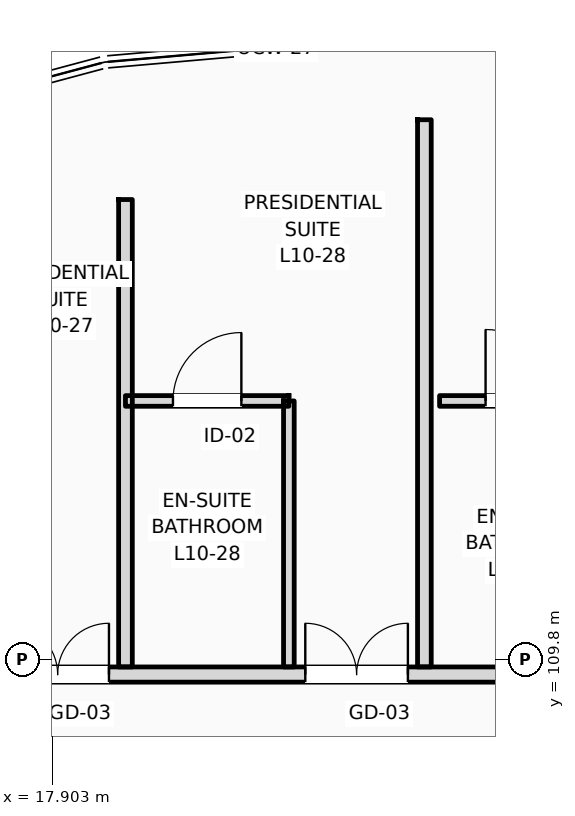
"""IFC4 building model, lengths in metres.
Left out: names, types, materials, properties, quantities, classifications, styles, units other than length and angle.
Written with IfcOpenShell. Run it as: python <this file> out.ifc"""

import sys

from ifc_helpers import new_model, si_unit, direction, frame, frame_2d, origin, place, context, subcontext, project, spatial, rectangle, extrude, element, fill, save


model = new_model("IFC4")
c1 = context("Model", 3, precision=1e-05, world=origin(), true_north=direction((0.0, 1.0)))
c2 = subcontext(c1, "Body", "Model", "MODEL_VIEW")
j1 = project(units=[si_unit("LENGTHUNIT", "METRE"), si_unit("PLANEANGLEUNIT", "RADIAN")], contexts=[c1])
p1 = place(None, origin())
s1 = spatial("IfcSite", under=j1, at=p1, CompositionType="ELEMENT")
p2 = place(p1, origin())
s2 = spatial("IfcBuilding", under=s1, at=p2, CompositionType="ELEMENT")
p3 = place(p2, frame((0.0, 0.0, 42.6)))
s3 = spatial("IfcBuildingStorey", under=s2, at=p3, CompositionType="ELEMENT", Elevation=42.6)
p4 = place(p3, frame((10.65, 109.6, 0.0), z_axis=(0.0, 0.0, 1.0), x_axis=(1.0, 0.0, 0.0)))
e1 = element("IfcWall", 1, at=p4, inside=s3, PredefinedType="PARTITIONING", context=c2, shape_type="SweptSolid", body=[
    extrude(rectangle(XDim=84.61, YDim=0.2, at=frame_2d((42.305, 0.0))), origin(), (0.0, 0.0, 1.0), 3.38),
])
p5 = place(p4, frame((15.926, 0.0, 0.0)))
e2 = element("IfcOpeningElement", 2, at=p5, cuts=e1, PredefinedType="OPENING", context=c2, shape_type="SweptSolid", body=[
    extrude(rectangle(XDim=1.02, YDim=2.2, at=frame_2d((0.51, 1.1))), frame((0.0, 0.11, 0.0), z_axis=(0.0, -1.0, 0.0), x_axis=(1.0, 0.0, 0.0)), (0.0, 0.0, 1.0), 0.22),
])
p6 = place(p4, frame((18.45, 0.0, 0.0)))
e3 = element("IfcOpeningElement", 3, at=p6, cuts=e1, PredefinedType="OPENING", context=c2, shape_type="SweptSolid", body=[
    extrude(rectangle(XDim=1.02, YDim=2.2, at=frame_2d((0.51, 1.1))), frame((0.0, 0.11, 0.0), z_axis=(0.0, -1.0, 0.0), x_axis=(1.0, 0.0, 0.0)), (0.0, 0.0, 1.0), 0.22),
])
p7 = place(p4, frame((25.742, 0.0, 0.0)))
e4 = element("IfcOpeningElement", 4, at=p7, cuts=e1, PredefinedType="OPENING", context=c2, shape_type="SweptSolid", body=[
    extrude(rectangle(XDim=1.02, YDim=2.2, at=frame_2d((0.51, 1.1))), frame((0.0, 0.11, 0.0), z_axis=(0.0, -1.0, 0.0), x_axis=(1.0, 0.0, 0.0)), (0.0, 0.0, 1.0), 0.22),
])
p8 = place(p4, frame((31.385, 0.0, 0.0)))
e5 = element("IfcOpeningElement", 5, at=p8, cuts=e1, PredefinedType="OPENING", context=c2, shape_type="SweptSolid", body=[
    extrude(rectangle(XDim=1.02, YDim=2.2, at=frame_2d((0.51, 1.1))), frame((0.0, 0.11, 0.0), z_axis=(0.0, -1.0, 0.0), x_axis=(1.0, 0.0, 0.0)), (0.0, 0.0, 1.0), 0.22),
])
p9 = place(p4, frame((33.908, 0.0, 0.0)))
e6 = element("IfcOpeningElement", 6, at=p9, cuts=e1, PredefinedType="OPENING", context=c2, shape_type="SweptSolid", body=[
    extrude(rectangle(XDim=0.96, YDim=2.2, at=frame_2d((0.48, 1.1))), frame((0.0, 0.11, 0.0), z_axis=(0.0, -1.0, 0.0), x_axis=(1.0, 0.0, 0.0)), (0.0, 0.0, 1.0), 0.22),
])
p10 = place(p4, frame((41.201, 0.0, 0.0)))
e7 = element("IfcOpeningElement", 7, at=p10, cuts=e1, PredefinedType="OPENING", context=c2, shape_type="SweptSolid", body=[
    extrude(rectangle(XDim=0.96, YDim=2.2, at=frame_2d((0.48, 1.1))), frame((0.0, 0.11, 0.0), z_axis=(0.0, -1.0, 0.0), x_axis=(1.0, 0.0, 0.0)), (0.0, 0.0, 1.0), 0.22),
])
p11 = place(p4, frame((46.844, 0.0, 0.0)))
e8 = element("IfcOpeningElement", 8, at=p11, cuts=e1, PredefinedType="OPENING", context=c2, shape_type="SweptSolid", body=[
    extrude(rectangle(XDim=0.96, YDim=2.2, at=frame_2d((0.48, 1.1))), frame((0.0, 0.11, 0.0), z_axis=(0.0, -1.0, 0.0), x_axis=(1.0, 0.0, 0.0)), (0.0, 0.0, 1.0), 0.22),
])
p12 = place(p4, frame((49.337, 0.0, 0.0)))
e9 = element("IfcOpeningElement", 9, at=p12, cuts=e1, PredefinedType="OPENING", context=c2, shape_type="SweptSolid", body=[
    extrude(rectangle(XDim=0.96, YDim=2.2, at=frame_2d((0.48, 1.1))), frame((0.0, 0.11, 0.0), z_axis=(0.0, -1.0, 0.0), x_axis=(1.0, 0.0, 0.0)), (0.0, 0.0, 1.0), 0.22),
])
p13 = place(p4, frame((56.63, 0.0, 0.0)))
e10 = element("IfcOpeningElement", 10, at=p13, cuts=e1, PredefinedType="OPENING", context=c2, shape_type="SweptSolid", body=[
    extrude(rectangle(XDim=0.96, YDim=2.2, at=frame_2d((0.48, 1.1))), frame((0.0, 0.11, 0.0), z_axis=(0.0, -1.0, 0.0), x_axis=(1.0, 0.0, 0.0)), (0.0, 0.0, 1.0), 0.22),
])
p14 = place(p4, frame((62.523, 0.0, 0.0)))
e11 = element("IfcOpeningElement", 11, at=p14, cuts=e1, PredefinedType="OPENING", context=c2, shape_type="SweptSolid", body=[
    extrude(rectangle(XDim=0.96, YDim=2.2, at=frame_2d((0.48, 1.1))), frame((0.0, 0.11, 0.0), z_axis=(0.0, -1.0, 0.0), x_axis=(1.0, 0.0, 0.0)), (0.0, 0.0, 1.0), 0.22),
])
p15 = place(p4, frame((64.765, 0.0, 0.0)))
e12 = element("IfcOpeningElement", 12, at=p15, cuts=e1, PredefinedType="OPENING", context=c2, shape_type="SweptSolid", body=[
    extrude(rectangle(XDim=0.96, YDim=2.2, at=frame_2d((0.48, 1.1))), frame((0.0, 0.11, 0.0), z_axis=(0.0, -1.0, 0.0), x_axis=(1.0, 0.0, 0.0)), (0.0, 0.0, 1.0), 0.22),
])
p16 = place(p4, frame((72.057, 0.0, 0.0)))
e13 = element("IfcOpeningElement", 13, at=p16, cuts=e1, PredefinedType="OPENING", context=c2, shape_type="SweptSolid", body=[
    extrude(rectangle(XDim=0.96, YDim=2.2, at=frame_2d((0.48, 1.1))), frame((0.0, 0.11, 0.0), z_axis=(0.0, -1.0, 0.0), x_axis=(1.0, 0.0, 0.0)), (0.0, 0.0, 1.0), 0.22),
])
p17 = place(p4, frame((74.55, 0.0, 0.0)))
e14 = element("IfcOpeningElement", 14, at=p17, cuts=e1, PredefinedType="OPENING", context=c2, shape_type="SweptSolid", body=[
    extrude(rectangle(XDim=0.96, YDim=2.2, at=frame_2d((0.48, 1.1))), frame((0.0, 0.11, 0.0), z_axis=(0.0, -1.0, 0.0), x_axis=(1.0, 0.0, 0.0)), (0.0, 0.0, 1.0), 0.22),
])
p18 = place(p4, frame((80.163, 0.0, 0.0)))
e15 = element("IfcOpeningElement", 15, at=p18, cuts=e1, PredefinedType="OPENING", context=c2, shape_type="SweptSolid", body=[
    extrude(rectangle(XDim=0.96, YDim=2.2, at=frame_2d((0.48, 1.1))), frame((0.0, 0.11, 0.0), z_axis=(0.0, -1.0, 0.0), x_axis=(1.0, 0.0, 0.0)), (0.0, 0.0, 1.0), 0.22),
])
p19 = place(p4, frame((2.716, 0.0, 0.0)))
e16 = element("IfcOpeningElement", 16, at=p19, cuts=e1, PredefinedType="OPENING", context=c2, shape_type="SweptSolid", body=[
    extrude(rectangle(XDim=1.35, YDim=2.25, at=frame_2d((0.675, 1.125))), frame((0.0, 0.11, 0.0), z_axis=(0.0, -1.0, 0.0), x_axis=(1.0, 0.0, 0.0)), (0.0, 0.0, 1.0), 0.22),
])
p20 = place(p4, frame((6.65, 0.0, 0.0)))
e17 = element("IfcOpeningElement", 17, at=p20, cuts=e1, PredefinedType="OPENING", context=c2, shape_type="SweptSolid", body=[
    extrude(rectangle(XDim=1.35, YDim=2.25, at=frame_2d((0.675, 1.125))), frame((0.0, 0.11, 0.0), z_axis=(0.0, -1.0, 0.0), x_axis=(1.0, 0.0, 0.0)), (0.0, 0.0, 1.0), 0.22),
])
p21 = place(p4, frame((10.583, 0.0, 0.0)))
e18 = element("IfcOpeningElement", 18, at=p21, cuts=e1, PredefinedType="OPENING", context=c2, shape_type="SweptSolid", body=[
    extrude(rectangle(XDim=1.35, YDim=2.25, at=frame_2d((0.675, 1.125))), frame((0.0, 0.11, 0.0), z_axis=(0.0, -1.0, 0.0), x_axis=(1.0, 0.0, 0.0)), (0.0, 0.0, 1.0), 0.22),
])
p22 = place(p3, frame((23.0, 113.2, 0.0), z_axis=(0.0, 0.0, 1.0), x_axis=(1.0, 0.0, 0.0)))
e19 = element("IfcWall", 19, at=p22, inside=s3, PredefinedType="PARTITIONING", context=c2, shape_type="SweptSolid", body=[
    extrude(rectangle(XDim=2.15, YDim=0.14, at=frame_2d((1.075, 0.0))), origin(), (0.0, 0.0, 1.0), 3.94),
])
p23 = place(p22, frame((0.605, 0.0, 0.0)))
e20 = element("IfcOpeningElement", 20, at=p23, cuts=e19, PredefinedType="OPENING", context=c2, shape_type="SweptSolid", body=[
    extrude(rectangle(XDim=0.94, YDim=2.15, at=frame_2d((0.47, 1.075))), frame((0.0, 0.08, 0.0), z_axis=(0.0, -1.0, 0.0), x_axis=(1.0, 0.0, 0.0)), (0.0, 0.0, 1.0), 0.16),
])
p24 = place(p3, frame((18.867, 109.7, 0.0), z_axis=(0.0, 0.0, 1.0), x_axis=(0.0, 1.0, 0.0)))
e21 = element("IfcWall", 21, at=p24, inside=s3, PredefinedType="PARTITIONING", context=c2, shape_type="SweptSolid", body=[
    extrude(rectangle(XDim=6.15, YDim=0.18, at=frame_2d((3.075, 0.0))), origin(), (0.0, 0.0, 1.0), 3.94),
])
p25 = place(p3, frame((22.8, 109.7, 0.0), z_axis=(0.0, 0.0, 1.0), x_axis=(0.0, 1.0, 0.0)))
e22 = element("IfcWall", 22, at=p25, inside=s3, PredefinedType="PARTITIONING", context=c2, shape_type="SweptSolid", body=[
    extrude(rectangle(XDim=7.2, YDim=0.18, at=frame_2d((3.6, 0.0))), origin(), (0.0, 0.0, 1.0), 3.94),
])
p26 = place(p3, frame((21.017, 109.7, 0.0), z_axis=(0.0, 0.0, 1.0), x_axis=(0.0, 1.0, 0.0)))
e23 = element("IfcWall", 23, at=p26, inside=s3, PredefinedType="PARTITIONING", context=c2, shape_type="SweptSolid", body=[
    extrude(rectangle(XDim=3.5, YDim=0.14, at=frame_2d((1.75, 0.0))), origin(), (0.0, 0.0, 1.0), 3.94),
])
p27 = place(p3, frame((18.867, 113.2, 0.0), z_axis=(0.0, 0.0, 1.0), x_axis=(1.0, 0.0, 0.0)))
e24 = element("IfcWall", 24, at=p27, inside=s3, PredefinedType="PARTITIONING", context=c2, shape_type="SweptSolid", body=[
    extrude(rectangle(XDim=2.15, YDim=0.14, at=frame_2d((1.075, 0.0))), origin(), (0.0, 0.0, 1.0), 3.94),
])
p28 = place(p27, frame((0.625, 0.0, 0.0)))
e25 = element("IfcOpeningElement", 25, at=p28, cuts=e24, PredefinedType="OPENING", context=c2, shape_type="SweptSolid", body=[
    extrude(rectangle(XDim=0.9, YDim=2.1, at=frame_2d((0.45, 1.05))), frame((0.0, 0.08, 0.0), z_axis=(0.0, -1.0, 0.0), x_axis=(1.0, 0.0, 0.0)), (0.0, 0.0, 1.0), 0.16),
])
p29 = place(p23, origin())
e26 = element("IfcDoor", 26, at=p29, inside=s3, OperationType="SINGLE_SWING_LEFT", PredefinedType="DOOR", context=c2, shape_type="SweptSolid", body=[
    extrude(rectangle(XDim=0.94, YDim=2.15, at=frame_2d((0.47, 1.075))), frame((0.0, 0.025, 0.0), z_axis=(0.0, -1.0, 0.0), x_axis=(1.0, 0.0, 0.0)), (0.0, 0.0, 1.0), 0.05),
])
fill(e20, e26)
p30 = place(p20, origin())
e27 = element("IfcDoor", 27, at=p30, inside=s3, OperationType="DOUBLE_SWING_LEFT", PredefinedType="DOOR", context=c2, shape_type="SweptSolid", body=[
    extrude(rectangle(XDim=1.35, YDim=2.25, at=frame_2d((0.675, 1.125))), frame((0.0, 0.025, 0.0), z_axis=(0.0, -1.0, 0.0), x_axis=(1.0, 0.0, 0.0)), (0.0, 0.0, 1.0), 0.05),
])
fill(e17, e27)
p31 = place(p21, origin())
e28 = element("IfcDoor", 28, at=p31, inside=s3, OperationType="DOUBLE_SWING_LEFT", PredefinedType="DOOR", context=c2, shape_type="SweptSolid", body=[
    extrude(rectangle(XDim=1.35, YDim=2.25, at=frame_2d((0.675, 1.125))), frame((0.0, 0.025, 0.0), z_axis=(0.0, -1.0, 0.0), x_axis=(1.0, 0.0, 0.0)), (0.0, 0.0, 1.0), 0.05),
])
fill(e18, e28)
p32 = place(p28, origin())
e29 = element("IfcDoor", 29, at=p32, inside=s3, OperationType="SINGLE_SWING_RIGHT", PredefinedType="DOOR", context=c2, shape_type="SweptSolid", body=[
    extrude(rectangle(XDim=0.9, YDim=2.1, at=frame_2d((0.45, 1.05))), frame((0.0, 0.025, 0.0), z_axis=(0.0, -1.0, 0.0), x_axis=(1.0, 0.0, 0.0)), (0.0, 0.0, 1.0), 0.05),
])
fill(e25, e29)
save(model, sys.argv[1])
